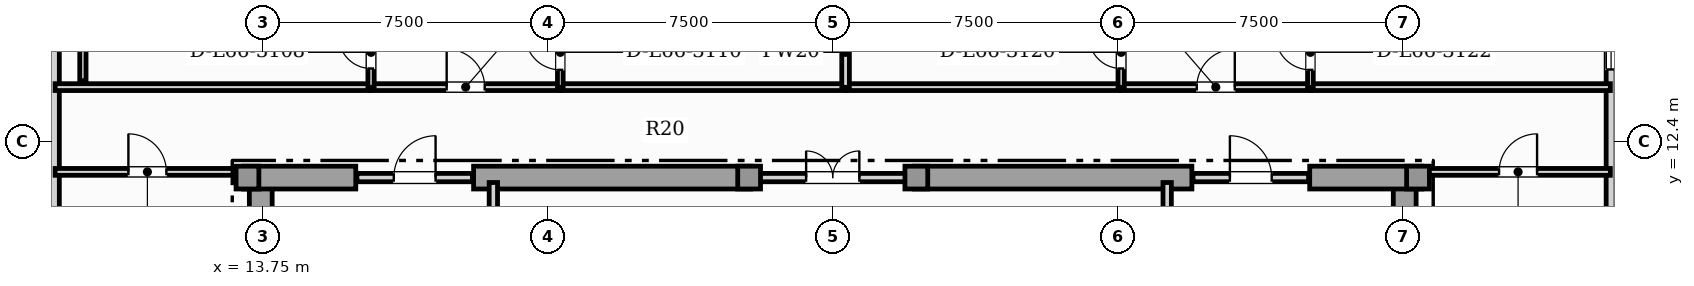
"""IFC4 building model, lengths in metres.
Left out: names, types, materials, properties, quantities, classifications, styles, units other than length and angle.
Written with IfcOpenShell. Run it as: python <this file> out.ifc"""

import sys

from ifc_helpers import new_model, si_unit, direction, frame, frame_2d, origin, origin_2d, place, context, subcontext, project, spatial, rectangle, extrude, element, fill, save


model = new_model("IFC4")
c1 = context("Model", 3, precision=1e-05, world=origin(), true_north=direction((0.0, 1.0)))
c2 = subcontext(c1, "Body", "Model", "MODEL_VIEW")
j1 = project(units=[si_unit("LENGTHUNIT", "METRE"), si_unit("PLANEANGLEUNIT", "RADIAN")], contexts=[c1])
p1 = place(None, origin())
s1 = spatial("IfcSite", under=j1, at=p1, CompositionType="ELEMENT")
p2 = place(p1, origin())
s2 = spatial("IfcBuilding", under=s1, at=p2, CompositionType="ELEMENT")
p3 = place(p2, frame((0.0, 0.0, 268.3)))
s3 = spatial("IfcBuildingStorey", under=s2, at=p3, CompositionType="ELEMENT", Elevation=268.3)
for number, where, z_axis, x_axis in (
    (1, (13.7, 0.92, 0.0), (0.0, 0.0, 1.0), (0.0, 1.0, 0.0)),
    (2, (43.8, 0.92, 0.0), (0.0, 0.0, 1.0), (0.0, 1.0, 0.0)),
):
    element("IfcWall", number, at=place(p3, frame(where, z_axis=z_axis, x_axis=x_axis)), inside=s3, PredefinedType="SHEAR", context=c2, shape_type="SweptSolid", body=[
        extrude(rectangle(XDim=10.53, YDim=0.6, at=frame_2d((5.265, 0.0))), origin(), (0.0, 0.0, 1.0), 3.65),
    ])
p4 = place(p3, frame((13.25, 11.45, 0.0), z_axis=(0.0, 0.0, 1.0), x_axis=(1.0, 0.0, 0.0)))
e3 = element("IfcWall", 3, at=p4, inside=s3, PredefinedType="SHEAR", context=c2, shape_type="SweptSolid", body=[
    extrude(rectangle(XDim=2.95, YDim=0.6, at=frame_2d((1.475, 0.0))), origin(), (0.0, 0.0, 1.0), 3.65),
])
for number, where, z_axis, x_axis in (
    (4, (19.3, 11.45, 0.0), (0.0, 0.0, 1.0), (1.0, 0.0, 0.0)),
    (5, (30.9, 11.45, 0.0), (0.0, 0.0, 1.0), (1.0, 0.0, 0.0)),
):
    element("IfcWall", number, at=place(p3, frame(where, z_axis=z_axis, x_axis=x_axis)), inside=s3, PredefinedType="SHEAR", context=c2, shape_type="SweptSolid", body=[
        extrude(rectangle(XDim=7.3, YDim=0.6, at=frame_2d((3.65, 0.0))), origin(), (0.0, 0.0, 1.0), 3.65),
    ])
p5 = place(p3, frame((41.3, 11.45, 0.0), z_axis=(0.0, 0.0, 1.0), x_axis=(1.0, 0.0, 0.0)))
e6 = element("IfcWall", 6, at=p5, inside=s3, PredefinedType="SHEAR", context=c2, shape_type="SweptSolid", body=[
    extrude(rectangle(XDim=2.95, YDim=0.6, at=frame_2d((1.475, 0.0))), origin(), (0.0, 0.0, 1.0), 3.65),
])
for number, where, z_axis, x_axis in (
    (7, (13.35, 11.45, 0.0), (0.0, 0.0, 1.0), (1.0, 0.0, 0.0)),
    (8, (44.15, 11.45, 0.0), (0.0, 0.0, 1.0), (1.0, 0.0, 0.0)),
    (9, (26.55, 11.45, 0.0), (0.0, 0.0, 1.0), (1.0, 0.0, 0.0)),
    (10, (30.95, 11.45, 0.0), (0.0, 0.0, 1.0), (1.0, 0.0, 0.0)),
):
    element("IfcColumn", number, at=place(p3, frame(where, z_axis=z_axis, x_axis=x_axis)), inside=s3, PredefinedType="COLUMN", context=c2, shape_type="SweptSolid", body=[
        extrude(rectangle(XDim=0.6, YDim=0.6, at=origin_2d()), origin(), (0.0, 0.0, 1.0), 3.85),
    ])
p6 = place(p3, frame((49.23, 3.24, 0.0), z_axis=(0.0, 0.0, 1.0), x_axis=(0.0, 1.0, 0.0)))
e11 = element("IfcWall", 11, at=p6, inside=s3, PredefinedType="SOLIDWALL", context=c2, shape_type="SweptSolid", body=[
    extrude(rectangle(XDim=16.195, YDim=0.26, at=frame_2d((8.097, 0.0))), origin(), (0.0, 0.0, 1.0), 3.65),
])
p7 = place(p6, frame((11.055, 0.0, 0.95)))
e12 = element("IfcOpeningElement", 12, at=p7, cuts=e11, PredefinedType="OPENING", context=c2, shape_type="SweptSolid", body=[
    extrude(rectangle(XDim=0.9, YDim=1.5, at=frame_2d((0.45, 0.75))), frame((0.0, 0.14, 0.0), z_axis=(0.0, -1.0, 0.0), x_axis=(1.0, 0.0, 0.0)), (0.0, 0.0, 1.0), 0.28),
])
p8 = place(p6, frame((12.817, 0.0, 0.88)))
e13 = element("IfcOpeningElement", 13, at=p8, cuts=e11, PredefinedType="OPENING", context=c2, shape_type="SweptSolid", body=[
    extrude(rectangle(XDim=1.65, YDim=2.0, at=frame_2d((0.825, 1.0))), frame((0.0, 0.14, 0.0), z_axis=(0.0, -1.0, 0.0), x_axis=(1.0, 0.0, 0.0)), (0.0, 0.0, 1.0), 0.28),
])
p9 = place(p3, frame((8.27, 19.435, 0.0), z_axis=(0.0, 0.0, 1.0), x_axis=(0.0, -1.0, 0.0)))
e14 = element("IfcWall", 14, at=p9, inside=s3, PredefinedType="SOLIDWALL", context=c2, shape_type="SweptSolid", body=[
    extrude(rectangle(XDim=16.195, YDim=0.26, at=frame_2d((8.097, 0.0))), origin(), (0.0, 0.0, 1.0), 3.65),
])
p10 = place(p9, frame((13.025, 0.0, 0.85)))
e15 = element("IfcOpeningElement", 15, at=p10, cuts=e14, PredefinedType="OPENING", context=c2, shape_type="SweptSolid", body=[
    extrude(rectangle(XDim=2.4, YDim=2.0, at=frame_2d((1.2, 1.0))), frame((0.0, 0.14, 0.0), z_axis=(0.0, -1.0, 0.0), x_axis=(1.0, 0.0, 0.0)), (0.0, 0.0, 1.0), 0.28),
])
p11 = place(p3, frame((19.82, 8.52, 0.0), z_axis=(0.0, 0.0, 1.0), x_axis=(0.0, 1.0, 0.0)))
e16 = element("IfcWall", 16, at=p11, inside=s3, PredefinedType="SOLIDWALL", context=c2, shape_type="SweptSolid", body=[
    extrude(rectangle(XDim=2.8, YDim=0.22, at=frame_2d((1.4, 0.0))), origin(), (0.0, 0.0, 1.0), 3.105),
])
p12 = place(p11, frame((0.85, 0.0, 0.0)))
e17 = element("IfcOpeningElement", 17, at=p12, cuts=e16, PredefinedType="OPENING", context=c2, shape_type="SweptSolid", body=[
    extrude(rectangle(XDim=1.1, YDim=2.2, at=frame_2d((0.55, 1.1))), frame((0.0, 0.12, 0.0), z_axis=(0.0, -1.0, 0.0), x_axis=(1.0, 0.0, 0.0)), (0.0, 0.0, 1.0), 0.24),
])
p13 = place(p3, frame((37.55, 8.52, 0.0), z_axis=(0.0, 0.0, 1.0), x_axis=(0.0, 1.0, 0.0)))
e18 = element("IfcWall", 18, at=p13, inside=s3, PredefinedType="SOLIDWALL", context=c2, shape_type="SweptSolid", body=[
    extrude(rectangle(XDim=2.8, YDim=0.22, at=frame_2d((1.4, 0.0))), origin(), (0.0, 0.0, 1.0), 3.105),
])
p14 = place(p13, frame((0.85, 0.0, 0.0)))
e19 = element("IfcOpeningElement", 19, at=p14, cuts=e18, PredefinedType="OPENING", context=c2, shape_type="SweptSolid", body=[
    extrude(rectangle(XDim=1.1, YDim=2.2, at=frame_2d((0.55, 1.1))), frame((0.0, 0.12, 0.0), z_axis=(0.0, -1.0, 0.0), x_axis=(1.0, 0.0, 0.0)), (0.0, 0.0, 1.0), 0.24),
])
p15 = place(p3, frame((16.23, 11.45, 0.0), z_axis=(0.0, 0.0, 1.0), x_axis=(1.0, 0.0, 0.0)))
e20 = element("IfcWall", 20, at=p15, inside=s3, PredefinedType="SOLIDWALL", context=c2, shape_type="SweptSolid", body=[
    extrude(rectangle(XDim=3.04, YDim=0.22, at=frame_2d((1.52, 0.0))), origin(), (0.0, 0.0, 1.0), 3.65),
])
p16 = place(p15, frame((0.97, 0.0, 0.0)))
e21 = element("IfcOpeningElement", 21, at=p16, cuts=e20, PredefinedType="OPENING", context=c2, shape_type="SweptSolid", body=[
    extrude(rectangle(XDim=1.1, YDim=2.2, at=frame_2d((0.55, 1.1))), frame((0.0, 0.12, 0.0), z_axis=(0.0, -1.0, 0.0), x_axis=(1.0, 0.0, 0.0)), (0.0, 0.0, 1.0), 0.24),
])
p17 = place(p3, frame((26.63, 11.45, 0.0), z_axis=(0.0, 0.0, 1.0), x_axis=(1.0, 0.0, 0.0)))
e22 = element("IfcWall", 22, at=p17, inside=s3, PredefinedType="SOLIDWALL", context=c2, shape_type="SweptSolid", body=[
    extrude(rectangle(XDim=4.24, YDim=0.22, at=frame_2d((2.12, 0.0))), origin(), (0.0, 0.0, 1.0), 3.65),
])
p18 = place(p17, frame((1.42, 0.0, 0.0)))
e23 = element("IfcOpeningElement", 23, at=p18, cuts=e22, PredefinedType="OPENING", context=c2, shape_type="SweptSolid", body=[
    extrude(rectangle(XDim=1.4, YDim=2.2, at=frame_2d((0.7, 1.1))), frame((0.0, 0.12, 0.0), z_axis=(0.0, -1.0, 0.0), x_axis=(1.0, 0.0, 0.0)), (0.0, 0.0, 1.0), 0.24),
])
p19 = place(p3, frame((38.23, 11.45, 0.0), z_axis=(0.0, 0.0, 1.0), x_axis=(1.0, 0.0, 0.0)))
e24 = element("IfcWall", 24, at=p19, inside=s3, PredefinedType="SOLIDWALL", context=c2, shape_type="SweptSolid", body=[
    extrude(rectangle(XDim=3.04, YDim=0.22, at=frame_2d((1.52, 0.0))), origin(), (0.0, 0.0, 1.0), 3.65),
])
p20 = place(p19, frame((0.97, 0.0, 0.0)))
e25 = element("IfcOpeningElement", 25, at=p20, cuts=e24, PredefinedType="OPENING", context=c2, shape_type="SweptSolid", body=[
    extrude(rectangle(XDim=1.1, YDim=2.2, at=frame_2d((0.55, 1.1))), frame((0.0, 0.12, 0.0), z_axis=(0.0, -1.0, 0.0), x_axis=(1.0, 0.0, 0.0)), (0.0, 0.0, 1.0), 0.24),
])
p21 = place(p3, frame((8.289, 11.6, 0.0), z_axis=(0.0, 0.0, 1.0), x_axis=(1.0, 0.0, 0.0)))
e26 = element("IfcWall", 26, at=p21, inside=s3, PredefinedType="PARTITIONING", context=c2, shape_type="SweptSolid", body=[
    extrude(rectangle(XDim=4.856, YDim=0.18, at=frame_2d((2.428, 0.0))), origin(), (0.0, 0.0, 1.0), 3.65),
])
p22 = place(p21, frame((1.928, 0.0, 0.0)))
e27 = element("IfcOpeningElement", 27, at=p22, cuts=e26, PredefinedType="OPENING", context=c2, shape_type="SweptSolid", body=[
    extrude(rectangle(XDim=1.0, YDim=2.15, at=frame_2d((0.5, 1.075))), frame((0.0, 0.1, 0.0), z_axis=(0.0, -1.0, 0.0), x_axis=(1.0, 0.0, 0.0)), (0.0, 0.0, 1.0), 0.2),
])
p23 = place(p3, frame((44.355, 11.6, 0.0), z_axis=(0.0, 0.0, 1.0), x_axis=(1.0, 0.0, 0.0)))
e28 = element("IfcWall", 28, at=p23, inside=s3, PredefinedType="PARTITIONING", context=c2, shape_type="SweptSolid", body=[
    extrude(rectangle(XDim=4.856, YDim=0.18, at=frame_2d((2.428, 0.0))), origin(), (0.0, 0.0, 1.0), 3.65),
])
p24 = place(p23, frame((1.928, 0.0, 0.0)))
e29 = element("IfcOpeningElement", 29, at=p24, cuts=e28, PredefinedType="OPENING", context=c2, shape_type="SweptSolid", body=[
    extrude(rectangle(XDim=1.0, YDim=2.15, at=frame_2d((0.5, 1.075))), frame((0.0, 0.1, 0.0), z_axis=(0.0, -1.0, 0.0), x_axis=(1.0, 0.0, 0.0)), (0.0, 0.0, 1.0), 0.2),
])
p25 = place(p3, frame((16.597, 13.83, 0.0), z_axis=(0.0, 0.0, 1.0), x_axis=(1.0, 0.0, 0.0)))
e30 = element("IfcWall", 30, at=p25, inside=s3, PredefinedType="PARTITIONING", context=c2, shape_type="SweptSolid", body=[
    extrude(rectangle(XDim=4.99, YDim=0.18, at=frame_2d((2.495, 0.0))), origin(), (0.0, 0.0, 1.0), 3.65),
])
p26 = place(p25, frame((1.995, 0.0, 0.0)))
e31 = element("IfcOpeningElement", 31, at=p26, cuts=e30, PredefinedType="OPENING", context=c2, shape_type="SweptSolid", body=[
    extrude(rectangle(XDim=1.0, YDim=2.15, at=frame_2d((0.5, 1.075))), frame((0.0, 0.1, 0.0), z_axis=(0.0, -1.0, 0.0), x_axis=(1.0, 0.0, 0.0)), (0.0, 0.0, 1.0), 0.2),
])
p27 = place(p3, frame((8.289, 13.83, 0.0), z_axis=(0.0, 0.0, 1.0), x_axis=(1.0, 0.0, 0.0)))
e32 = element("IfcWall", 32, at=p27, inside=s3, PredefinedType="PARTITIONING", context=c2, shape_type="SweptSolid", body=[
    extrude(rectangle(XDim=8.278, YDim=0.18, at=frame_2d((4.139, 0.0))), origin(), (0.0, 0.0, 1.0), 3.65),
])
p28 = place(p3, frame((21.617, 13.83, 0.0), z_axis=(0.0, 0.0, 1.0), x_axis=(1.0, 0.0, 0.0)))
e33 = element("IfcWall", 33, at=p28, inside=s3, PredefinedType="PARTITIONING", context=c2, shape_type="SweptSolid", body=[
    extrude(rectangle(XDim=7.476, YDim=0.18, at=frame_2d((3.738, 0.0))), origin(), (0.0, 0.0, 1.0), 3.65),
])
p29 = place(p3, frame((36.334, 13.83, 0.0), z_axis=(0.0, 0.0, 1.0), x_axis=(1.0, 0.0, 0.0)))
e34 = element("IfcWall", 34, at=p29, inside=s3, PredefinedType="PARTITIONING", context=c2, shape_type="SweptSolid", body=[
    extrude(rectangle(XDim=4.99, YDim=0.18, at=frame_2d((2.495, 0.0))), origin(), (0.0, 0.0, 1.0), 3.65),
])
p30 = place(p29, frame((1.995, 0.0, 0.0)))
e35 = element("IfcOpeningElement", 35, at=p30, cuts=e34, PredefinedType="OPENING", context=c2, shape_type="SweptSolid", body=[
    extrude(rectangle(XDim=1.0, YDim=2.15, at=frame_2d((0.5, 1.075))), frame((0.0, 0.1, 0.0), z_axis=(0.0, -1.0, 0.0), x_axis=(1.0, 0.0, 0.0)), (0.0, 0.0, 1.0), 0.2),
])
p31 = place(p3, frame((29.123, 13.83, 0.0), z_axis=(0.0, 0.0, 1.0), x_axis=(1.0, 0.0, 0.0)))
e36 = element("IfcWall", 36, at=p31, inside=s3, PredefinedType="PARTITIONING", context=c2, shape_type="SweptSolid", body=[
    extrude(rectangle(XDim=7.181, YDim=0.18, at=frame_2d((3.591, 0.0))), origin(), (0.0, 0.0, 1.0), 3.65),
])
p32 = place(p3, frame((41.354, 13.83, 0.0), z_axis=(0.0, 0.0, 1.0), x_axis=(1.0, 0.0, 0.0)))
e37 = element("IfcWall", 37, at=p32, inside=s3, PredefinedType="PARTITIONING", context=c2, shape_type="SweptSolid", body=[
    extrude(rectangle(XDim=7.857, YDim=0.18, at=frame_2d((3.928, 0.0))), origin(), (0.0, 0.0, 1.0), 3.65),
])
p33 = place(p3, frame((16.602, 13.825, 0.0), z_axis=(0.0, 0.0, 1.0), x_axis=(0.0, 1.0, 0.0)))
e38 = element("IfcWall", 38, at=p33, inside=s3, PredefinedType="PLUMBINGWALL", context=c2, shape_type="SweptSolid", body=[
    extrude(rectangle(XDim=1.84, YDim=0.165, at=frame_2d((0.92, 0.0))), origin(), (0.0, 0.0, 1.0), 3.65),
])
p34 = place(p33, frame((0.495, 0.0, 0.0)))
e39 = element("IfcOpeningElement", 39, at=p34, cuts=e38, PredefinedType="OPENING", context=c2, shape_type="SweptSolid", body=[
    extrude(rectangle(XDim=0.85, YDim=2.1, at=frame_2d((0.425, 1.05))), frame((0.0, 0.093, 0.0), z_axis=(0.0, -1.0, 0.0), x_axis=(1.0, 0.0, 0.0)), (0.0, 0.0, 1.0), 0.185),
])
p35 = place(p3, frame((21.582, 13.825, 0.0), z_axis=(0.0, 0.0, 1.0), x_axis=(0.0, 1.0, 0.0)))
e40 = element("IfcWall", 40, at=p35, inside=s3, PredefinedType="PARTITIONING", context=c2, shape_type="SweptSolid", body=[
    extrude(rectangle(XDim=1.84, YDim=0.15, at=frame_2d((0.92, 0.0))), origin(), (0.0, 0.0, 1.0), 3.65),
])
p36 = place(p35, frame((0.46, 0.0, 0.0)))
e41 = element("IfcOpeningElement", 41, at=p36, cuts=e40, PredefinedType="OPENING", context=c2, shape_type="SweptSolid", body=[
    extrude(rectangle(XDim=0.92, YDim=2.1, at=frame_2d((0.46, 1.05))), frame((0.0, 0.085, 0.0), z_axis=(0.0, -1.0, 0.0), x_axis=(1.0, 0.0, 0.0)), (0.0, 0.0, 1.0), 0.17),
])
p37 = place(p3, frame((29.088, 13.825, 0.0), z_axis=(0.0, 0.0, 1.0), x_axis=(0.0, 1.0, 0.0)))
e42 = element("IfcWall", 42, at=p37, inside=s3, PredefinedType="PARTITIONING", context=c2, shape_type="SweptSolid", body=[
    extrude(rectangle(XDim=1.84, YDim=0.2, at=frame_2d((0.92, 0.0))), origin(), (0.0, 0.0, 1.0), 3.65),
])
p38 = place(p3, frame((36.339, 13.825, 0.0), z_axis=(0.0, 0.0, 1.0), x_axis=(0.0, 1.0, 0.0)))
e43 = element("IfcWall", 43, at=p38, inside=s3, PredefinedType="PLUMBINGWALL", context=c2, shape_type="SweptSolid", body=[
    extrude(rectangle(XDim=1.84, YDim=0.165, at=frame_2d((0.92, 0.0))), origin(), (0.0, 0.0, 1.0), 3.295),
])
p39 = place(p38, frame((0.495, 0.0, 0.0)))
e44 = element("IfcOpeningElement", 44, at=p39, cuts=e43, PredefinedType="OPENING", context=c2, shape_type="SweptSolid", body=[
    extrude(rectangle(XDim=0.85, YDim=2.1, at=frame_2d((0.425, 1.05))), frame((0.0, 0.093, 0.0), z_axis=(0.0, -1.0, 0.0), x_axis=(1.0, 0.0, 0.0)), (0.0, 0.0, 1.0), 0.185),
])
p40 = place(p3, frame((41.319, 13.825, 0.0), z_axis=(0.0, 0.0, 1.0), x_axis=(0.0, 1.0, 0.0)))
e45 = element("IfcWall", 45, at=p40, inside=s3, PredefinedType="PARTITIONING", context=c2, shape_type="SweptSolid", body=[
    extrude(rectangle(XDim=1.84, YDim=0.15, at=frame_2d((0.92, 0.0))), origin(), (0.0, 0.0, 1.0), 3.65),
])
p41 = place(p40, frame((0.46, 0.0, 0.0)))
e46 = element("IfcOpeningElement", 46, at=p41, cuts=e45, PredefinedType="OPENING", context=c2, shape_type="SweptSolid", body=[
    extrude(rectangle(XDim=0.92, YDim=2.1, at=frame_2d((0.46, 1.05))), frame((0.0, 0.085, 0.0), z_axis=(0.0, -1.0, 0.0), x_axis=(1.0, 0.0, 0.0)), (0.0, 0.0, 1.0), 0.17),
])
p42 = place(p3, frame((9.02, 13.995, 0.0), z_axis=(0.0, 0.0, 1.0), x_axis=(0.0, 1.0, 0.0)))
e47 = element("IfcWall", 47, at=p42, inside=s3, PredefinedType="PLUMBINGWALL", context=c2, shape_type="SweptSolid", body=[
    extrude(rectangle(XDim=1.5, YDim=0.165, at=frame_2d((0.75, 0.0))), origin(), (0.0, 0.0, 1.0), 3.65),
])
p43 = place(p7, origin())
e48 = element("IfcWindow", 48, at=p43, inside=s3, PartitioningType="SINGLE_PANEL", PredefinedType="WINDOW", context=c2, shape_type="SweptSolid", body=[
    extrude(rectangle(XDim=0.9, YDim=1.5, at=frame_2d((0.45, 0.75))), frame((0.0, 0.03, 0.0), z_axis=(0.0, -1.0, 0.0), x_axis=(1.0, 0.0, 0.0)), (0.0, 0.0, 1.0), 0.06),
])
fill(e12, e48)
p44 = place(p16, origin())
e49 = element("IfcDoor", 49, at=p44, inside=s3, OperationType="SINGLE_SWING_RIGHT", PredefinedType="DOOR", context=c2, shape_type="SweptSolid", body=[
    extrude(rectangle(XDim=1.1, YDim=2.2, at=frame_2d((0.55, 1.1))), frame((0.0, 0.025, 0.0), z_axis=(0.0, -1.0, 0.0), x_axis=(1.0, 0.0, 0.0)), (0.0, 0.0, 1.0), 0.05),
])
fill(e21, e49)
p45 = place(p18, origin())
e50 = element("IfcDoor", 50, at=p45, inside=s3, OperationType="DOUBLE_DOOR_SINGLE_SWING", PredefinedType="DOOR", context=c2, shape_type="SweptSolid", body=[
    extrude(rectangle(XDim=1.4, YDim=2.2, at=frame_2d((0.7, 1.1))), frame((0.0, 0.025, 0.0), z_axis=(0.0, -1.0, 0.0), x_axis=(1.0, 0.0, 0.0)), (0.0, 0.0, 1.0), 0.05),
])
fill(e23, e50)
p46 = place(p20, origin())
e51 = element("IfcDoor", 51, at=p46, inside=s3, OperationType="SINGLE_SWING_LEFT", PredefinedType="DOOR", context=c2, shape_type="SweptSolid", body=[
    extrude(rectangle(XDim=1.1, YDim=2.2, at=frame_2d((0.55, 1.1))), frame((0.0, 0.025, 0.0), z_axis=(0.0, -1.0, 0.0), x_axis=(1.0, 0.0, 0.0)), (0.0, 0.0, 1.0), 0.05),
])
fill(e25, e51)
p47 = place(p22, origin())
e52 = element("IfcDoor", 52, at=p47, inside=s3, OperationType="SINGLE_SWING_LEFT", PredefinedType="DOOR", context=c2, shape_type="SweptSolid", body=[
    extrude(rectangle(XDim=1.0, YDim=2.15, at=frame_2d((0.5, 1.075))), frame((0.0, 0.025, 0.0), z_axis=(0.0, -1.0, 0.0), x_axis=(1.0, 0.0, 0.0)), (0.0, 0.0, 1.0), 0.05),
])
fill(e27, e52)
p48 = place(p24, origin())
e53 = element("IfcDoor", 53, at=p48, inside=s3, OperationType="SINGLE_SWING_RIGHT", PredefinedType="DOOR", context=c2, shape_type="SweptSolid", body=[
    extrude(rectangle(XDim=1.0, YDim=2.15, at=frame_2d((0.5, 1.075))), frame((0.0, 0.025, 0.0), z_axis=(0.0, -1.0, 0.0), x_axis=(1.0, 0.0, 0.0)), (0.0, 0.0, 1.0), 0.05),
])
fill(e29, e53)
p49 = place(p26, origin())
e54 = element("IfcDoor", 54, at=p49, inside=s3, OperationType="SINGLE_SWING_LEFT", PredefinedType="DOOR", context=c2, shape_type="SweptSolid", body=[
    extrude(rectangle(XDim=1.0, YDim=2.15, at=frame_2d((0.5, 1.075))), frame((0.0, 0.025, 0.0), z_axis=(0.0, -1.0, 0.0), x_axis=(1.0, 0.0, 0.0)), (0.0, 0.0, 1.0), 0.05),
])
fill(e31, e54)
p50 = place(p30, origin())
e55 = element("IfcDoor", 55, at=p50, inside=s3, OperationType="SINGLE_SWING_RIGHT", PredefinedType="DOOR", context=c2, shape_type="SweptSolid", body=[
    extrude(rectangle(XDim=1.0, YDim=2.15, at=frame_2d((0.5, 1.075))), frame((0.0, 0.025, 0.0), z_axis=(0.0, -1.0, 0.0), x_axis=(1.0, 0.0, 0.0)), (0.0, 0.0, 1.0), 0.05),
])
fill(e35, e55)
p51 = place(p34, origin())
e56 = element("IfcDoor", 56, at=p51, inside=s3, OperationType="SINGLE_SWING_RIGHT", PredefinedType="DOOR", context=c2, shape_type="SweptSolid", body=[
    extrude(rectangle(XDim=0.85, YDim=2.1, at=frame_2d((0.425, 1.05))), frame((0.0, 0.025, 0.0), z_axis=(0.0, -1.0, 0.0), x_axis=(1.0, 0.0, 0.0)), (0.0, 0.0, 1.0), 0.05),
])
fill(e39, e56)
p52 = place(p36, origin())
e57 = element("IfcDoor", 57, at=p52, inside=s3, OperationType="SINGLE_SWING_RIGHT", PredefinedType="DOOR", context=c2, shape_type="SweptSolid", body=[
    extrude(rectangle(XDim=0.92, YDim=2.1, at=frame_2d((0.46, 1.05))), frame((0.0, 0.025, 0.0), z_axis=(0.0, -1.0, 0.0), x_axis=(1.0, 0.0, 0.0)), (0.0, 0.0, 1.0), 0.05),
])
fill(e41, e57)
p53 = place(p39, origin())
e58 = element("IfcDoor", 58, at=p53, inside=s3, OperationType="SINGLE_SWING_RIGHT", PredefinedType="DOOR", context=c2, shape_type="SweptSolid", body=[
    extrude(rectangle(XDim=0.85, YDim=2.1, at=frame_2d((0.425, 1.05))), frame((0.0, 0.025, 0.0), z_axis=(0.0, -1.0, 0.0), x_axis=(1.0, 0.0, 0.0)), (0.0, 0.0, 1.0), 0.05),
])
fill(e44, e58)
p54 = place(p41, origin())
e59 = element("IfcDoor", 59, at=p54, inside=s3, OperationType="SINGLE_SWING_RIGHT", PredefinedType="DOOR", context=c2, shape_type="SweptSolid", body=[
    extrude(rectangle(XDim=0.92, YDim=2.1, at=frame_2d((0.46, 1.05))), frame((0.0, 0.025, 0.0), z_axis=(0.0, -1.0, 0.0), x_axis=(1.0, 0.0, 0.0)), (0.0, 0.0, 1.0), 0.05),
])
fill(e46, e59)
save(model, sys.argv[1])
